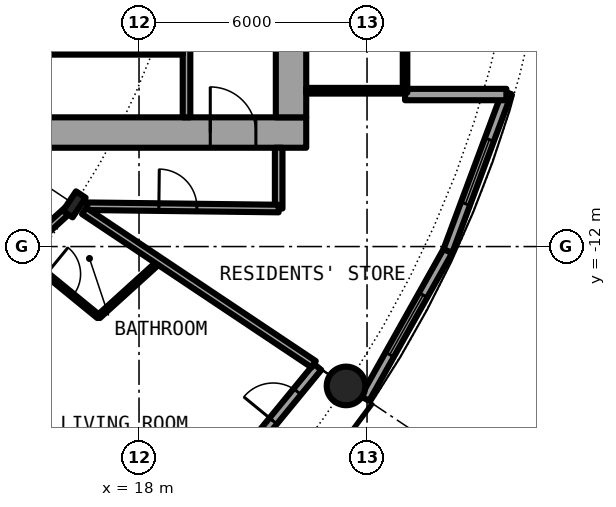
"""IFC4 building model, lengths in metres.
Left out: names, types, materials, properties, quantities, classifications, styles, units other than length and angle.
Written with IfcOpenShell. Run it as: python <this file> out.ifc"""

import sys

from ifc_helpers import new_model, si_unit, direction, frame, frame_2d, origin, origin_2d, place, context, subcontext, project, spatial, rectangle, hollow_circle, i_section, extrude, element, fill, save


model = new_model("IFC4")
c1 = context("Model", 3, precision=1e-05, world=origin(), true_north=direction((0.0, 1.0)))
c2 = subcontext(c1, "Body", "Model", "MODEL_VIEW")
j1 = project(units=[si_unit("LENGTHUNIT", "METRE"), si_unit("PLANEANGLEUNIT", "RADIAN")], contexts=[c1])
p1 = place(None, origin())
s1 = spatial("IfcSite", under=j1, at=p1, CompositionType="ELEMENT")
p2 = place(p1, origin())
s2 = spatial("IfcBuilding", under=s1, at=p2, CompositionType="ELEMENT")
p3 = place(p2, frame((0.0, 0.0, 28.9)))
s3 = spatial("IfcBuildingStorey", under=s2, at=p3, CompositionType="ELEMENT", Elevation=28.9)
p4 = place(p3, frame((23.448, -15.667, 0.0), z_axis=(0.0, 0.0, 1.0), x_axis=(1.0, 0.0, 0.0)))
e1 = element("IfcColumn", 1, at=p4, inside=s3, PredefinedType="COLUMN", context=c2, shape_type="SweptSolid", body=[
    extrude(hollow_circle(Radius=0.508, WallThickness=0.05, at=origin_2d()), origin(), (0.0, 0.0, 1.0), 3.05),
])
p5 = place(p3, frame((16.297, -10.889, 0.0), z_axis=(0.0, 0.0, 1.0), x_axis=(0.831469612303, -0.55557023302, 0.0)))
e2 = element("IfcColumn", 2, at=p5, inside=s3, PredefinedType="COLUMN", context=c2, shape_type="SweptSolid", body=[
    extrude(i_section(OverallWidth=0.305, OverallDepth=0.62, WebThickness=0.021, FlangeThickness=0.04, FilletRadius=0.027, at=origin_2d()), origin(), (0.0, 0.0, 1.0), 3.05),
])
p6 = place(p3, frame((19.304, -19.304, 0.0), z_axis=(0.0, 0.0, 1.0), x_axis=(0.634382322723, 0.773019449054, 0.0)))
e3 = element("IfcWall", 3, at=p6, inside=s3, PredefinedType="SOLIDWALL", context=c2, shape_type="SweptSolid", body=[
    extrude(rectangle(XDim=5.352, YDim=0.25, at=frame_2d((2.676, 0.0))), origin(), (0.0, 0.0, 1.0), 2.7),
])
p7 = place(p6, frame((0.441, 0.0, 0.3)))
e4 = element("IfcOpeningElement", 4, at=p7, cuts=e3, PredefinedType="OPENING", context=c2, shape_type="SweptSolid", body=[
    extrude(rectangle(XDim=1.8, YDim=2.1, at=frame_2d((0.9, 1.05))), frame((0.0, 0.135, 0.0), z_axis=(0.0, -1.0, 0.0), x_axis=(1.0, 0.0, 0.0)), (0.0, 0.0, 1.0), 0.27),
])
p8 = place(p6, frame((3.51, 0.0, 0.0)))
e5 = element("IfcOpeningElement", 5, at=p8, cuts=e3, PredefinedType="OPENING", context=c2, shape_type="SweptSolid", body=[
    extrude(rectangle(XDim=1.0, YDim=2.2, at=frame_2d((0.5, 1.1))), frame((0.0, 0.135, 0.0), z_axis=(0.0, -1.0, 0.0), x_axis=(1.0, 0.0, 0.0)), (0.0, 0.0, 1.0), 0.27),
])
p9 = place(p3, frame((23.946, -16.0, 0.0), z_axis=(0.0, 0.0, 1.0), x_axis=(0.489696356642, 0.871893042919, 0.0)))
e6 = element("IfcWall", 6, at=p9, inside=s3, PredefinedType="SOLIDWALL", context=c2, shape_type="SweptSolid", body=[
    extrude(rectangle(XDim=4.454, YDim=0.25, at=frame_2d((2.227, 0.0))), origin(), (0.0, 0.0, 1.0), 2.7),
])
p10 = place(p9, frame((1.327, 0.0, 0.3)))
e7 = element("IfcOpeningElement", 7, at=p10, cuts=e6, PredefinedType="OPENING", context=c2, shape_type="SweptSolid", body=[
    extrude(rectangle(XDim=1.8, YDim=2.1, at=frame_2d((0.9, 1.05))), frame((0.0, 0.135, 0.0), z_axis=(0.0, -1.0, 0.0), x_axis=(1.0, 0.0, 0.0)), (0.0, 0.0, 1.0), 0.27),
])
p11 = place(p3, frame((26.127, -12.117, 0.0), z_axis=(0.0, 0.0, 1.0), x_axis=(0.349247811493, 0.937030397675, 0.0)))
e8 = element("IfcWall", 8, at=p11, inside=s3, PredefinedType="SOLIDWALL", context=c2, shape_type="SweptSolid", body=[
    extrude(rectangle(XDim=4.452, YDim=0.25, at=frame_2d((2.226, 0.0))), origin(), (0.0, 0.0, 1.0), 2.7),
])
p12 = place(p11, frame((1.327, 0.0, 0.3)))
e9 = element("IfcOpeningElement", 9, at=p12, cuts=e8, PredefinedType="OPENING", context=c2, shape_type="SweptSolid", body=[
    extrude(rectangle(XDim=1.8, YDim=2.1, at=frame_2d((0.9, 1.05))), frame((0.0, 0.135, 0.0), z_axis=(0.0, -1.0, 0.0), x_axis=(1.0, 0.0, 0.0)), (0.0, 0.0, 1.0), 0.27),
])
p13 = place(p3, frame((25.0, -8.0, 0.0), z_axis=(0.0, 0.0, 1.0), x_axis=(1.0, 0.0, 0.0)))
e10 = element("IfcWall", 10, at=p13, inside=s3, PredefinedType="SOLIDWALL", context=c2, shape_type="SweptSolid", body=[
    extrude(rectangle(XDim=2.667, YDim=0.3, at=frame_2d((1.333, 0.0))), origin(), (0.0, 0.0, 1.0), 2.7),
])
p14 = place(p3, frame((8.2, -9.0, 0.0), z_axis=(0.0, 0.0, 1.0), x_axis=(1.0, 0.0, 0.0)))
e11 = element("IfcWall", 11, at=p14, inside=s3, PredefinedType="SHEAR", context=c2, shape_type="SweptSolid", body=[
    extrude(rectangle(XDim=14.2, YDim=0.8, at=frame_2d((7.1, 0.0))), origin(), (0.0, 0.0, 1.0), 3.05),
])
p15 = place(p14, frame((11.675, 0.0, 0.0)))
e12 = element("IfcOpeningElement", 12, at=p15, cuts=e11, PredefinedType="OPENING", context=c2, shape_type="SweptSolid", body=[
    extrude(rectangle(XDim=1.2, YDim=2.3, at=frame_2d((0.6, 1.15))), frame((0.0, 0.41, 0.0), z_axis=(0.0, -1.0, 0.0), x_axis=(1.0, 0.0, 0.0)), (0.0, 0.0, 1.0), 0.82),
])
p16 = place(p3, frame((22.0, 8.6, 0.0), z_axis=(0.0, 0.0, 1.0), x_axis=(0.0, -1.0, 0.0)))
e13 = element("IfcWall", 13, at=p16, inside=s3, PredefinedType="SHEAR", context=c2, shape_type="SweptSolid", body=[
    extrude(rectangle(XDim=17.2, YDim=0.8, at=frame_2d((8.6, 0.0))), origin(), (0.0, 0.0, 1.0), 3.05),
])
p17 = place(p16, frame((7.7, 0.0, 0.0)))
e14 = element("IfcOpeningElement", 14, at=p17, cuts=e13, PredefinedType="OPENING", context=c2, shape_type="SweptSolid", body=[
    extrude(rectangle(XDim=1.8, YDim=2.3, at=frame_2d((0.9, 1.15))), frame((0.0, 0.41, 0.0), z_axis=(0.0, -1.0, 0.0), x_axis=(1.0, 0.0, 0.0)), (0.0, 0.0, 1.0), 0.82),
])
p18 = place(p3, frame((19.25, -8.6, 0.0), z_axis=(0.0, 0.0, 1.0), x_axis=(0.0, 1.0, 0.0)))
e15 = element("IfcWall", 15, at=p18, inside=s3, PredefinedType="SOLIDWALL", context=c2, shape_type="SweptSolid", body=[
    extrude(rectangle(XDim=7.025, YDim=0.2, at=frame_2d((3.513, 0.0))), origin(), (0.0, 0.0, 1.0), 2.7),
])
p19 = place(p18, frame((2.35, 0.0, 0.0)))
e16 = element("IfcOpeningElement", 16, at=p19, cuts=e15, PredefinedType="OPENING", context=c2, shape_type="SweptSolid", body=[
    extrude(rectangle(XDim=1.1, YDim=2.3, at=frame_2d((0.55, 1.15))), frame((0.0, 0.11, 0.0), z_axis=(0.0, -1.0, 0.0), x_axis=(1.0, 0.0, 0.0)), (0.0, 0.0, 1.0), 0.22),
])
p20 = place(p3, frame((15.45, -6.875, 0.0), z_axis=(0.0, 0.0, 1.0), x_axis=(1.0, 0.0, 0.0)))
e17 = element("IfcWall", 17, at=p20, inside=s3, PredefinedType="PARTITIONING", context=c2, shape_type="SweptSolid", body=[
    extrude(rectangle(XDim=3.7, YDim=0.15, at=frame_2d((1.85, 0.0))), origin(), (0.0, 0.0, 1.0), 2.7),
])
p21 = place(p20, frame((1.4, 0.0, 0.0)))
e18 = element("IfcOpeningElement", 18, at=p21, cuts=e17, PredefinedType="OPENING", context=c2, shape_type="SweptSolid", body=[
    extrude(rectangle(XDim=0.9, YDim=2.3, at=frame_2d((0.45, 1.15))), frame((0.0, 0.085, 0.0), z_axis=(0.0, -1.0, 0.0), x_axis=(1.0, 0.0, 0.0)), (0.0, 0.0, 1.0), 0.17),
])
p22 = place(p3, frame((22.4, -7.9, 0.0), z_axis=(0.0, 0.0, 1.0), x_axis=(1.0, 0.0, 0.0)))
e19 = element("IfcWall", 19, at=p22, inside=s3, PredefinedType="PARTITIONING", context=c2, shape_type="SweptSolid", body=[
    extrude(rectangle(XDim=2.54, YDim=0.15, at=frame_2d((1.27, 0.0))), origin(), (0.0, 0.0, 1.0), 2.7),
])
p23 = place(p3, frame((25.0, -7.95, 0.0), z_axis=(0.0, 0.0, 1.0), x_axis=(0.0, 1.0, 0.0)))
e20 = element("IfcWall", 20, at=p23, inside=s3, PredefinedType="PARTITIONING", context=c2, shape_type="SweptSolid", body=[
    extrude(rectangle(XDim=15.9, YDim=0.12, at=frame_2d((7.95, 0.0))), origin(), (0.0, 0.0, 1.0), 2.7),
])
p24 = place(p23, frame((0.95, 0.0, 0.1)))
e21 = element("IfcOpeningElement", 21, at=p24, cuts=e20, PredefinedType="OPENING", context=c2, shape_type="SweptSolid", body=[
    extrude(rectangle(XDim=14.0, YDim=2.35, at=frame_2d((7.0, 1.175))), frame((0.0, 0.07, 0.0), z_axis=(0.0, -1.0, 0.0), x_axis=(1.0, 0.0, 0.0)), (0.0, 0.0, 1.0), 0.14),
])
p25 = place(p3, frame((21.675, -11.0, 0.0), z_axis=(0.0, 0.0, 1.0), x_axis=(0.0, 1.0, 0.0)))
e22 = element("IfcWall", 22, at=p25, inside=s3, PredefinedType="PARTITIONING", context=c2, shape_type="SweptSolid", body=[
    extrude(rectangle(XDim=1.6, YDim=0.2, at=frame_2d((0.8, 0.0))), origin(), (0.0, 0.0, 1.0), 2.7),
])
p26 = place(p3, frame((16.936, -13.845, 0.0), z_axis=(0.0, 0.0, 1.0), x_axis=(0.740836325503, 0.671685595212, 0.0)))
e23 = element("IfcWall", 23, at=p26, inside=s3, PredefinedType="PARTITIONING", context=c2, shape_type="SweptSolid", body=[
    extrude(rectangle(XDim=2.168, YDim=0.1, at=frame_2d((1.084, 0.0))), origin(), (0.0, 0.0, 1.0), 2.7),
])
p27 = place(p3, frame((9.239, -17.286, 0.0), z_axis=(0.0, 0.0, 1.0), x_axis=(0.74089212117, 0.671624050186, 0.0)))
e24 = element("IfcWall", 24, at=p27, inside=s3, PredefinedType="PARTITIONING", context=c2, shape_type="SweptSolid", body=[
    extrude(rectangle(XDim=9.368, YDim=0.2, at=frame_2d((4.684, 0.0))), origin(), (0.0, 0.0, 1.0), 2.38),
])
p28 = place(p27, frame((5.215, 0.0, 0.0)))
e25 = element("IfcOpeningElement", 25, at=p28, cuts=e24, PredefinedType="OPENING", context=c2, shape_type="SweptSolid", body=[
    extrude(rectangle(XDim=1.0, YDim=2.3, at=frame_2d((0.5, 1.15))), frame((0.0, 0.11, 0.0), z_axis=(0.0, -1.0, 0.0), x_axis=(1.0, 0.0, 0.0)), (0.0, 0.0, 1.0), 0.22),
])
p29 = place(p3, frame((16.636, -10.939, 0.0), z_axis=(0.0, 0.0, 1.0), x_axis=(0.999926652916, -0.012111514691, 0.0)))
e26 = element("IfcWall", 26, at=p29, inside=s3, PredefinedType="PARTITIONING", context=c2, shape_type="SweptSolid", body=[
    extrude(rectangle(XDim=5.04, YDim=0.2, at=frame_2d((2.52, 0.0))), origin(), (0.0, 0.0, 1.0), 2.7),
])
p30 = place(p29, frame((1.886, 0.0, 0.0)))
e27 = element("IfcOpeningElement", 27, at=p30, cuts=e26, PredefinedType="OPENING", context=c2, shape_type="SweptSolid", body=[
    extrude(rectangle(XDim=1.0, YDim=2.3, at=frame_2d((0.5, 1.15))), frame((0.0, 0.11, 0.0), z_axis=(0.0, -1.0, 0.0), x_axis=(1.0, 0.0, 0.0)), (0.0, 0.0, 1.0), 0.22),
])
p31 = place(p3, frame((12.062, -14.727, 0.0), z_axis=(0.0, 0.0, 1.0), x_axis=(0.633664062855, -0.773608334654, 0.0)))
e28 = element("IfcWall", 28, at=p31, inside=s3, PredefinedType="PARTITIONING", context=c2, shape_type="SweptSolid", body=[
    extrude(rectangle(XDim=8.138, YDim=0.1, at=frame_2d((4.069, 0.0))), origin(), (0.0, 0.0, 1.0), 2.7),
])
p32 = place(p31, frame((0.861, 0.0, 0.0)))
e29 = element("IfcOpeningElement", 29, at=p32, cuts=e28, PredefinedType="OPENING", context=c2, shape_type="SweptSolid", body=[
    extrude(rectangle(XDim=0.9, YDim=2.3, at=frame_2d((0.45, 1.15))), frame((0.0, 0.06, 0.0), z_axis=(0.0, -1.0, 0.0), x_axis=(1.0, 0.0, 0.0)), (0.0, 0.0, 1.0), 0.12),
])
p33 = place(p31, frame((4.931, 0.0, 0.0)))
e30 = element("IfcOpeningElement", 30, at=p33, cuts=e28, PredefinedType="OPENING", context=c2, shape_type="SweptSolid", body=[
    extrude(rectangle(XDim=0.9, YDim=2.3, at=frame_2d((0.45, 1.15))), frame((0.0, 0.06, 0.0), z_axis=(0.0, -1.0, 0.0), x_axis=(1.0, 0.0, 0.0)), (0.0, 0.0, 1.0), 0.12),
])
p34 = place(p3, frame((14.885, -12.168, 0.0), z_axis=(0.0, 0.0, 1.0), x_axis=(0.774162545943, -0.632986850147, 0.0)))
e31 = element("IfcWall", 31, at=p34, inside=s3, PredefinedType="PARTITIONING", context=c2, shape_type="SweptSolid", body=[
    extrude(rectangle(XDim=2.649, YDim=0.1, at=frame_2d((1.325, 0.0))), origin(), (0.0, 0.0, 1.0), 2.7),
])
p35 = place(p34, frame((0.875, 0.0, 0.0)))
e32 = element("IfcOpeningElement", 32, at=p35, cuts=e31, PredefinedType="OPENING", context=c2, shape_type="SweptSolid", body=[
    extrude(rectangle(XDim=0.9, YDim=2.3, at=frame_2d((0.45, 1.15))), frame((0.0, 0.06, 0.0), z_axis=(0.0, -1.0, 0.0), x_axis=(1.0, 0.0, 0.0)), (0.0, 0.0, 1.0), 0.12),
])
p36 = place(p3, frame((16.555, -11.061, 0.0), z_axis=(0.0, 0.0, 1.0), x_axis=(0.831507055747, -0.555514190857, 0.0)))
e33 = element("IfcWall", 33, at=p36, inside=s3, PredefinedType="PARTITIONING", context=c2, shape_type="SweptSolid", body=[
    extrude(rectangle(XDim=7.265, YDim=0.2, at=frame_2d((3.633, 0.0))), origin(), (0.0, 0.0, 1.0), 2.7),
])
p37 = place(p8, origin())
e34 = element("IfcDoor", 34, at=p37, inside=s3, OperationType="SINGLE_SWING_LEFT", PredefinedType="DOOR", context=c2, shape_type="SweptSolid", body=[
    extrude(rectangle(XDim=1.0, YDim=2.2, at=frame_2d((0.5, 1.1))), frame((0.0, 0.025, 0.0), z_axis=(0.0, -1.0, 0.0), x_axis=(1.0, 0.0, 0.0)), (0.0, 0.0, 1.0), 0.05),
])
fill(e5, e34)
p38 = place(p10, origin())
e35 = element("IfcWindow", 35, at=p38, inside=s3, PartitioningType="SINGLE_PANEL", PredefinedType="WINDOW", context=c2, shape_type="SweptSolid", body=[
    extrude(rectangle(XDim=1.8, YDim=2.1, at=frame_2d((0.9, 1.05))), frame((0.0, 0.03, 0.0), z_axis=(0.0, -1.0, 0.0), x_axis=(1.0, 0.0, 0.0)), (0.0, 0.0, 1.0), 0.06),
])
fill(e7, e35)
p39 = place(p12, origin())
e36 = element("IfcWindow", 36, at=p39, inside=s3, PartitioningType="SINGLE_PANEL", PredefinedType="WINDOW", context=c2, shape_type="SweptSolid", body=[
    extrude(rectangle(XDim=1.8, YDim=2.1, at=frame_2d((0.9, 1.05))), frame((0.0, 0.03, 0.0), z_axis=(0.0, -1.0, 0.0), x_axis=(1.0, 0.0, 0.0)), (0.0, 0.0, 1.0), 0.06),
])
fill(e9, e36)
p40 = place(p21, origin())
e37 = element("IfcDoor", 37, at=p40, inside=s3, OperationType="SINGLE_SWING_LEFT", PredefinedType="DOOR", context=c2, shape_type="SweptSolid", body=[
    extrude(rectangle(XDim=0.9, YDim=2.3, at=frame_2d((0.45, 1.15))), frame((0.0, 0.025, 0.0), z_axis=(0.0, -1.0, 0.0), x_axis=(1.0, 0.0, 0.0)), (0.0, 0.0, 1.0), 0.05),
])
fill(e18, e37)
p41 = place(p15, origin())
e38 = element("IfcDoor", 38, at=p41, inside=s3, OperationType="SINGLE_SWING_LEFT", PredefinedType="DOOR", context=c2, shape_type="SweptSolid", body=[
    extrude(rectangle(XDim=1.2, YDim=2.3, at=frame_2d((0.6, 1.15))), frame((0.0, 0.025, 0.0), z_axis=(0.0, -1.0, 0.0), x_axis=(1.0, 0.0, 0.0)), (0.0, 0.0, 1.0), 0.05),
])
fill(e12, e38)
p42 = place(p24, origin())
e39 = element("IfcWindow", 39, at=p42, inside=s3, PartitioningType="SINGLE_PANEL", PredefinedType="WINDOW", context=c2, shape_type="SweptSolid", body=[
    extrude(rectangle(XDim=14.0, YDim=2.35, at=frame_2d((7.0, 1.175))), frame((0.0, 0.03, 0.0), z_axis=(0.0, -1.0, 0.0), x_axis=(1.0, 0.0, 0.0)), (0.0, 0.0, 1.0), 0.06),
])
fill(e21, e39)
p43 = place(p35, origin())
e40 = element("IfcDoor", 40, at=p43, inside=s3, OperationType="SINGLE_SWING_RIGHT", PredefinedType="DOOR", context=c2, shape_type="SweptSolid", body=[
    extrude(rectangle(XDim=0.9, YDim=2.3, at=frame_2d((0.45, 1.15))), frame((0.0, 0.025, 0.0), z_axis=(0.0, -1.0, 0.0), x_axis=(1.0, 0.0, 0.0)), (0.0, 0.0, 1.0), 0.05),
])
fill(e32, e40)
p44 = place(p30, origin())
e41 = element("IfcDoor", 41, at=p44, inside=s3, OperationType="SINGLE_SWING_LEFT", PredefinedType="DOOR", context=c2, shape_type="SweptSolid", body=[
    extrude(rectangle(XDim=1.0, YDim=2.3, at=frame_2d((0.5, 1.15))), frame((0.0, 0.025, 0.0), z_axis=(0.0, -1.0, 0.0), x_axis=(1.0, 0.0, 0.0)), (0.0, 0.0, 1.0), 0.05),
])
fill(e27, e41)
save(model, sys.argv[1])
